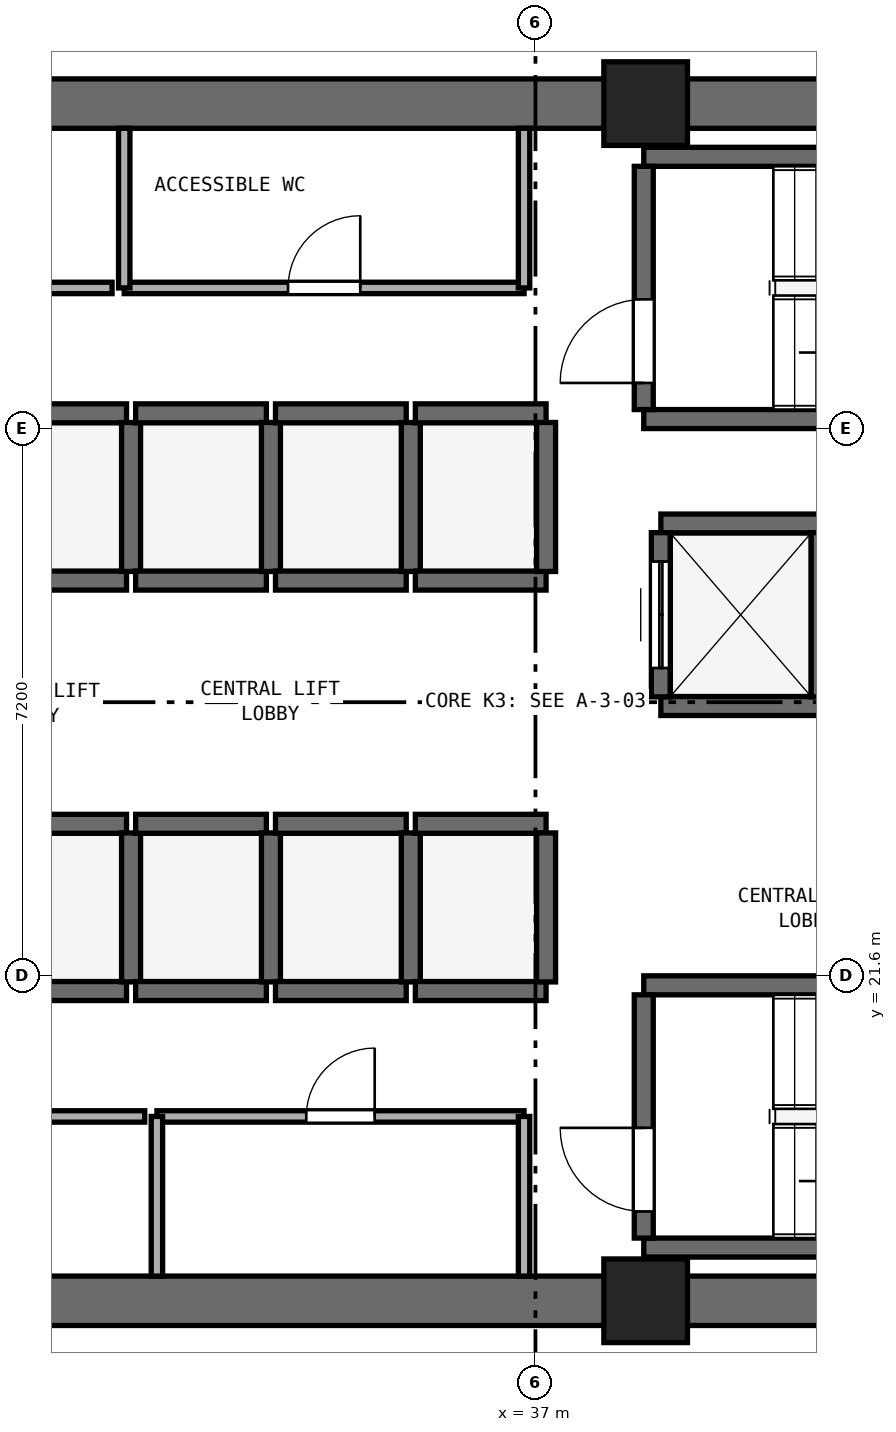
"""IFC4 building model, lengths in metres.
Left out: names, types, materials, properties, quantities, classifications, styles, units other than length and angle.
Written with IfcOpenShell. Run it as: python <this file> out.ifc"""

import sys

from ifc_helpers import new_model, si_unit, direction, frame, frame_2d, origin, origin_2d, place, context, subcontext, project, spatial, rectangle, extrude, element, fill, save


model = new_model("IFC4")
c1 = context("Model", 3, precision=1e-05, world=origin(), true_north=direction((0.0, 1.0)))
c2 = subcontext(c1, "Body", "Model", "MODEL_VIEW")
j1 = project(units=[si_unit("LENGTHUNIT", "METRE"), si_unit("PLANEANGLEUNIT", "RADIAN")], contexts=[c1])
p1 = place(None, origin())
s1 = spatial("IfcSite", under=j1, at=p1, CompositionType="ELEMENT")
p2 = place(p1, origin())
s2 = spatial("IfcBuilding", under=s1, at=p2, CompositionType="ELEMENT")
p3 = place(p2, frame((0.0, 0.0, 108.6)))
s3 = spatial("IfcBuildingStorey", under=s2, at=p3, CompositionType="ELEMENT", Elevation=108.6)
for number, where, z_axis, x_axis in (
    (1, (25.4, 17.325, 0.0), (0.0, 0.0, 1.0), (1.0, 0.0, 0.0)),
    (2, (25.4, 33.075, 0.0), (0.0, 0.0, 1.0), (1.0, 0.0, 0.0)),
):
    element("IfcWall", number, at=place(p3, frame(where, z_axis=z_axis, x_axis=x_axis)), inside=s3, PredefinedType="SHEAR", context=c2, shape_type="SweptSolid", body=[
        extrude(rectangle(XDim=23.2, YDim=0.65, at=frame_2d((11.6, 0.0))), origin(), (0.0, 0.0, 1.0), 3.525),
    ])
for number, where, z_axis, x_axis in (
    (3, (38.45, 17.325, 0.0), (0.0, 0.0, 1.0), (1.0, 0.0, 0.0)),
    (4, (38.45, 33.075, 0.0), (0.0, 0.0, 1.0), (1.0, 0.0, 0.0)),
):
    element("IfcColumn", number, at=place(p3, frame(where, z_axis=z_axis, x_axis=x_axis)), inside=s3, PredefinedType="PILASTER", context=c2, shape_type="SweptSolid", body=[
        extrude(rectangle(XDim=1.1, YDim=1.1, at=origin_2d()), origin(), (0.0, 0.0, 1.0), 3.8),
    ])
for number, where, z_axis, x_axis in (
    (5, (38.425, 28.925, 0.0), (0.0, 0.0, 1.0), (1.0, 0.0, 0.0)),
    (6, (38.425, 32.375, 0.0), (0.0, 0.0, 1.0), (1.0, 0.0, 0.0)),
):
    element("IfcWall", number, at=place(p3, frame(where, z_axis=z_axis, x_axis=x_axis)), inside=s3, PredefinedType="SHEAR", context=c2, shape_type="SweptSolid", body=[
        extrude(rectangle(XDim=7.3, YDim=0.25, at=frame_2d((3.65, 0.0))), origin(), (0.0, 0.0, 1.0), 3.525),
    ])
p4 = place(p3, frame((38.425, 29.05, 0.0), z_axis=(0.0, 0.0, 1.0), x_axis=(0.0, 1.0, 0.0)))
e7 = element("IfcWall", 7, at=p4, inside=s3, PredefinedType="SHEAR", context=c2, shape_type="SweptSolid", body=[
    extrude(rectangle(XDim=3.2, YDim=0.25, at=frame_2d((1.6, 0.0))), origin(), (0.0, 0.0, 1.0), 3.525),
])
p5 = place(p4, frame((0.35, 0.0, 0.0)))
e8 = element("IfcOpeningElement", 8, at=p5, cuts=e7, PredefinedType="OPENING", context=c2, shape_type="SweptSolid", body=[
    extrude(rectangle(XDim=1.1, YDim=2.15, at=frame_2d((0.55, 1.075))), frame((0.0, 0.135, 0.0), z_axis=(0.0, -1.0, 0.0), x_axis=(1.0, 0.0, 0.0)), (0.0, 0.0, 1.0), 0.27),
])
for number, where, z_axis, x_axis in (
    (9, (38.425, 18.025, 0.0), (0.0, 0.0, 1.0), (1.0, 0.0, 0.0)),
    (10, (38.425, 21.475, 0.0), (0.0, 0.0, 1.0), (1.0, 0.0, 0.0)),
):
    element("IfcWall", number, at=place(p3, frame(where, z_axis=z_axis, x_axis=x_axis)), inside=s3, PredefinedType="SHEAR", context=c2, shape_type="SweptSolid", body=[
        extrude(rectangle(XDim=7.3, YDim=0.25, at=frame_2d((3.65, 0.0))), origin(), (0.0, 0.0, 1.0), 3.525),
    ])
p6 = place(p3, frame((38.425, 18.15, 0.0), z_axis=(0.0, 0.0, 1.0), x_axis=(0.0, 1.0, 0.0)))
e11 = element("IfcWall", 11, at=p6, inside=s3, PredefinedType="SHEAR", context=c2, shape_type="SweptSolid", body=[
    extrude(rectangle(XDim=3.2, YDim=0.25, at=frame_2d((1.6, 0.0))), origin(), (0.0, 0.0, 1.0), 3.525),
])
p7 = place(p6, frame((0.35, 0.0, 0.0)))
e12 = element("IfcOpeningElement", 12, at=p7, cuts=e11, PredefinedType="OPENING", context=c2, shape_type="SweptSolid", body=[
    extrude(rectangle(XDim=1.1, YDim=2.15, at=frame_2d((0.55, 1.075))), frame((0.0, 0.135, 0.0), z_axis=(0.0, -1.0, 0.0), x_axis=(1.0, 0.0, 0.0)), (0.0, 0.0, 1.0), 0.27),
])
for number, where, z_axis, x_axis in (
    (13, (29.9, 21.4, 0.0), (0.0, 0.0, 1.0), (1.0, 0.0, 0.0)),
    (14, (29.9, 23.6, 0.0), (0.0, 0.0, 1.0), (1.0, 0.0, 0.0)),
):
    element("IfcWall", number, at=place(p3, frame(where, z_axis=z_axis, x_axis=x_axis)), inside=s3, PredefinedType="SHEAR", context=c2, shape_type="SweptSolid", body=[
        extrude(rectangle(XDim=1.72, YDim=0.25, at=frame_2d((0.86, 0.0))), origin(), (0.0, 0.0, 1.0), 3.525),
    ])
p8 = place(p3, frame((31.68, 21.52, 0.0), z_axis=(0.0, 0.0, 1.0), x_axis=(0.0, 1.0, 0.0)))
e15 = element("IfcWall", 15, at=p8, inside=s3, PredefinedType="SHEAR", context=c2, shape_type="SweptSolid", body=[
    extrude(rectangle(XDim=1.96, YDim=0.25, at=frame_2d((0.98, 0.0))), origin(), (0.0, 0.0, 1.0), 3.525),
])
for number, where, z_axis, x_axis in (
    (16, (31.74, 21.4, 0.0), (0.0, 0.0, 1.0), (1.0, 0.0, 0.0)),
    (17, (31.74, 23.6, 0.0), (0.0, 0.0, 1.0), (1.0, 0.0, 0.0)),
):
    element("IfcWall", number, at=place(p3, frame(where, z_axis=z_axis, x_axis=x_axis)), inside=s3, PredefinedType="SHEAR", context=c2, shape_type="SweptSolid", body=[
        extrude(rectangle(XDim=1.72, YDim=0.25, at=frame_2d((0.86, 0.0))), origin(), (0.0, 0.0, 1.0), 3.525),
    ])
p9 = place(p3, frame((33.52, 21.52, 0.0), z_axis=(0.0, 0.0, 1.0), x_axis=(0.0, 1.0, 0.0)))
e18 = element("IfcWall", 18, at=p9, inside=s3, PredefinedType="SHEAR", context=c2, shape_type="SweptSolid", body=[
    extrude(rectangle(XDim=1.96, YDim=0.25, at=frame_2d((0.98, 0.0))), origin(), (0.0, 0.0, 1.0), 3.525),
])
for number, where, z_axis, x_axis in (
    (19, (33.58, 21.4, 0.0), (0.0, 0.0, 1.0), (1.0, 0.0, 0.0)),
    (20, (33.58, 23.6, 0.0), (0.0, 0.0, 1.0), (1.0, 0.0, 0.0)),
):
    element("IfcWall", number, at=place(p3, frame(where, z_axis=z_axis, x_axis=x_axis)), inside=s3, PredefinedType="SHEAR", context=c2, shape_type="SweptSolid", body=[
        extrude(rectangle(XDim=1.72, YDim=0.25, at=frame_2d((0.86, 0.0))), origin(), (0.0, 0.0, 1.0), 3.525),
    ])
p10 = place(p3, frame((35.36, 21.52, 0.0), z_axis=(0.0, 0.0, 1.0), x_axis=(0.0, 1.0, 0.0)))
e21 = element("IfcWall", 21, at=p10, inside=s3, PredefinedType="SHEAR", context=c2, shape_type="SweptSolid", body=[
    extrude(rectangle(XDim=1.96, YDim=0.25, at=frame_2d((0.98, 0.0))), origin(), (0.0, 0.0, 1.0), 3.525),
])
for number, where, z_axis, x_axis in (
    (22, (35.42, 21.4, 0.0), (0.0, 0.0, 1.0), (1.0, 0.0, 0.0)),
    (23, (35.42, 23.6, 0.0), (0.0, 0.0, 1.0), (1.0, 0.0, 0.0)),
):
    element("IfcWall", number, at=place(p3, frame(where, z_axis=z_axis, x_axis=x_axis)), inside=s3, PredefinedType="SHEAR", context=c2, shape_type="SweptSolid", body=[
        extrude(rectangle(XDim=1.72, YDim=0.25, at=frame_2d((0.86, 0.0))), origin(), (0.0, 0.0, 1.0), 3.525),
    ])
p11 = place(p3, frame((37.14, 21.52, 0.0), z_axis=(0.0, 0.0, 1.0), x_axis=(0.0, 1.0, 0.0)))
e24 = element("IfcWall", 24, at=p11, inside=s3, PredefinedType="SHEAR", context=c2, shape_type="SweptSolid", body=[
    extrude(rectangle(XDim=1.96, YDim=0.25, at=frame_2d((0.98, 0.0))), origin(), (0.0, 0.0, 1.0), 3.525),
])
for number, where, z_axis, x_axis in (
    (25, (29.9, 26.8, 0.0), (0.0, 0.0, 1.0), (1.0, 0.0, 0.0)),
    (26, (29.9, 29.0, 0.0), (0.0, 0.0, 1.0), (1.0, 0.0, 0.0)),
):
    element("IfcWall", number, at=place(p3, frame(where, z_axis=z_axis, x_axis=x_axis)), inside=s3, PredefinedType="SHEAR", context=c2, shape_type="SweptSolid", body=[
        extrude(rectangle(XDim=1.72, YDim=0.25, at=frame_2d((0.86, 0.0))), origin(), (0.0, 0.0, 1.0), 3.525),
    ])
p12 = place(p3, frame((31.68, 26.92, 0.0), z_axis=(0.0, 0.0, 1.0), x_axis=(0.0, 1.0, 0.0)))
e27 = element("IfcWall", 27, at=p12, inside=s3, PredefinedType="SHEAR", context=c2, shape_type="SweptSolid", body=[
    extrude(rectangle(XDim=1.96, YDim=0.25, at=frame_2d((0.98, 0.0))), origin(), (0.0, 0.0, 1.0), 3.525),
])
for number, where, z_axis, x_axis in (
    (28, (31.74, 26.8, 0.0), (0.0, 0.0, 1.0), (1.0, 0.0, 0.0)),
    (29, (31.74, 29.0, 0.0), (0.0, 0.0, 1.0), (1.0, 0.0, 0.0)),
):
    element("IfcWall", number, at=place(p3, frame(where, z_axis=z_axis, x_axis=x_axis)), inside=s3, PredefinedType="SHEAR", context=c2, shape_type="SweptSolid", body=[
        extrude(rectangle(XDim=1.72, YDim=0.25, at=frame_2d((0.86, 0.0))), origin(), (0.0, 0.0, 1.0), 3.525),
    ])
p13 = place(p3, frame((33.52, 26.92, 0.0), z_axis=(0.0, 0.0, 1.0), x_axis=(0.0, 1.0, 0.0)))
e30 = element("IfcWall", 30, at=p13, inside=s3, PredefinedType="SHEAR", context=c2, shape_type="SweptSolid", body=[
    extrude(rectangle(XDim=1.96, YDim=0.25, at=frame_2d((0.98, 0.0))), origin(), (0.0, 0.0, 1.0), 3.525),
])
for number, where, z_axis, x_axis in (
    (31, (33.58, 26.8, 0.0), (0.0, 0.0, 1.0), (1.0, 0.0, 0.0)),
    (32, (33.58, 29.0, 0.0), (0.0, 0.0, 1.0), (1.0, 0.0, 0.0)),
):
    element("IfcWall", number, at=place(p3, frame(where, z_axis=z_axis, x_axis=x_axis)), inside=s3, PredefinedType="SHEAR", context=c2, shape_type="SweptSolid", body=[
        extrude(rectangle(XDim=1.72, YDim=0.25, at=frame_2d((0.86, 0.0))), origin(), (0.0, 0.0, 1.0), 3.525),
    ])
p14 = place(p3, frame((35.36, 26.92, 0.0), z_axis=(0.0, 0.0, 1.0), x_axis=(0.0, 1.0, 0.0)))
e33 = element("IfcWall", 33, at=p14, inside=s3, PredefinedType="SHEAR", context=c2, shape_type="SweptSolid", body=[
    extrude(rectangle(XDim=1.96, YDim=0.25, at=frame_2d((0.98, 0.0))), origin(), (0.0, 0.0, 1.0), 3.525),
])
for number, where, z_axis, x_axis in (
    (34, (35.42, 26.8, 0.0), (0.0, 0.0, 1.0), (1.0, 0.0, 0.0)),
    (35, (35.42, 29.0, 0.0), (0.0, 0.0, 1.0), (1.0, 0.0, 0.0)),
):
    element("IfcWall", number, at=place(p3, frame(where, z_axis=z_axis, x_axis=x_axis)), inside=s3, PredefinedType="SHEAR", context=c2, shape_type="SweptSolid", body=[
        extrude(rectangle(XDim=1.72, YDim=0.25, at=frame_2d((0.86, 0.0))), origin(), (0.0, 0.0, 1.0), 3.525),
    ])
p15 = place(p3, frame((37.14, 26.92, 0.0), z_axis=(0.0, 0.0, 1.0), x_axis=(0.0, 1.0, 0.0)))
e36 = element("IfcWall", 36, at=p15, inside=s3, PredefinedType="SHEAR", context=c2, shape_type="SweptSolid", body=[
    extrude(rectangle(XDim=1.96, YDim=0.25, at=frame_2d((0.98, 0.0))), origin(), (0.0, 0.0, 1.0), 3.525),
])
for number, where, z_axis, x_axis in (
    (37, (38.65, 25.15, 0.0), (0.0, 0.0, 1.0), (1.0, 0.0, 0.0)),
    (38, (38.65, 27.55, 0.0), (0.0, 0.0, 1.0), (1.0, 0.0, 0.0)),
):
    element("IfcWall", number, at=place(p3, frame(where, z_axis=z_axis, x_axis=x_axis)), inside=s3, PredefinedType="SHEAR", context=c2, shape_type="SweptSolid", body=[
        extrude(rectangle(XDim=2.1, YDim=0.25, at=frame_2d((1.05, 0.0))), origin(), (0.0, 0.0, 1.0), 3.525),
    ])
p16 = place(p3, frame((38.65, 25.27, 0.0), z_axis=(0.0, 0.0, 1.0), x_axis=(0.0, 1.0, 0.0)))
e39 = element("IfcWall", 39, at=p16, inside=s3, PredefinedType="SHEAR", context=c2, shape_type="SweptSolid", body=[
    extrude(rectangle(XDim=2.16, YDim=0.25, at=frame_2d((1.08, 0.0))), origin(), (0.0, 0.0, 1.0), 3.525),
])
p17 = place(p16, frame((0.38, 0.0, 0.0)))
e40 = element("IfcOpeningElement", 40, at=p17, cuts=e39, PredefinedType="OPENING", context=c2, shape_type="SweptSolid", body=[
    extrude(rectangle(XDim=1.4, YDim=2.2, at=frame_2d((0.7, 1.1))), frame((0.0, 0.135, 0.0), z_axis=(0.0, -1.0, 0.0), x_axis=(1.0, 0.0, 0.0)), (0.0, 0.0, 1.0), 0.27),
])
p18 = place(p3, frame((40.75, 25.27, 0.0), z_axis=(0.0, 0.0, 1.0), x_axis=(0.0, 1.0, 0.0)))
e41 = element("IfcWall", 41, at=p18, inside=s3, PredefinedType="SHEAR", context=c2, shape_type="SweptSolid", body=[
    extrude(rectangle(XDim=2.16, YDim=0.25, at=frame_2d((1.08, 0.0))), origin(), (0.0, 0.0, 1.0), 3.525),
])
p19 = place(p3, frame((26.17, 30.65, 0.0), z_axis=(0.0, 0.0, 1.0), x_axis=(1.0, 0.0, 0.0)))
e42 = element("IfcWall", 42, at=p19, inside=s3, PredefinedType="PARTITIONING", context=c2, shape_type="SweptSolid", body=[
    extrude(rectangle(XDim=5.26, YDim=0.15, at=frame_2d((2.63, 0.0))), origin(), (0.0, 0.0, 1.0), 3.525),
])
p20 = place(p19, frame((2.155, 0.0, 0.0)))
e43 = element("IfcOpeningElement", 43, at=p20, cuts=e42, PredefinedType="OPENING", context=c2, shape_type="SweptSolid", body=[
    extrude(rectangle(XDim=0.95, YDim=2.1, at=frame_2d((0.475, 1.05))), frame((0.0, 0.085, 0.0), z_axis=(0.0, -1.0, 0.0), x_axis=(1.0, 0.0, 0.0)), (0.0, 0.0, 1.0), 0.17),
])
p21 = place(p3, frame((31.59, 30.65, 0.0), z_axis=(0.0, 0.0, 1.0), x_axis=(1.0, 0.0, 0.0)))
e44 = element("IfcWall", 44, at=p21, inside=s3, PredefinedType="PARTITIONING", context=c2, shape_type="SweptSolid", body=[
    extrude(rectangle(XDim=5.26, YDim=0.15, at=frame_2d((2.63, 0.0))), origin(), (0.0, 0.0, 1.0), 3.525),
])
p22 = place(p21, frame((2.155, 0.0, 0.0)))
e45 = element("IfcOpeningElement", 45, at=p22, cuts=e44, PredefinedType="OPENING", context=c2, shape_type="SweptSolid", body=[
    extrude(rectangle(XDim=0.95, YDim=2.1, at=frame_2d((0.475, 1.05))), frame((0.0, 0.085, 0.0), z_axis=(0.0, -1.0, 0.0), x_axis=(1.0, 0.0, 0.0)), (0.0, 0.0, 1.0), 0.17),
])
for number, where, z_axis, x_axis in (
    (46, (31.59, 30.65, 0.0), (0.0, 0.0, 1.0), (0.0, 1.0, 0.0)),
    (47, (36.85, 30.65, 0.0), (0.0, 0.0, 1.0), (0.0, 1.0, 0.0)),
):
    element("IfcWall", number, at=place(p3, frame(where, z_axis=z_axis, x_axis=x_axis)), inside=s3, PredefinedType="PARTITIONING", context=c2, shape_type="SweptSolid", body=[
        extrude(rectangle(XDim=2.1, YDim=0.15, at=frame_2d((1.05, 0.0))), origin(), (0.0, 0.0, 1.0), 3.525),
    ])
p23 = place(p3, frame((26.17, 19.75, 0.0), z_axis=(0.0, 0.0, 1.0), x_axis=(1.0, 0.0, 0.0)))
e48 = element("IfcWall", 48, at=p23, inside=s3, PredefinedType="PARTITIONING", context=c2, shape_type="SweptSolid", body=[
    extrude(rectangle(XDim=5.69, YDim=0.15, at=frame_2d((2.845, 0.0))), origin(), (0.0, 0.0, 1.0), 3.525),
])
p24 = place(p23, frame((2.37, 0.0, 0.0)))
e49 = element("IfcOpeningElement", 49, at=p24, cuts=e48, PredefinedType="OPENING", context=c2, shape_type="SweptSolid", body=[
    extrude(rectangle(XDim=0.95, YDim=2.1, at=frame_2d((0.475, 1.05))), frame((0.0, 0.085, 0.0), z_axis=(0.0, -1.0, 0.0), x_axis=(1.0, 0.0, 0.0)), (0.0, 0.0, 1.0), 0.17),
])
p25 = place(p3, frame((32.02, 19.75, 0.0), z_axis=(0.0, 0.0, 1.0), x_axis=(1.0, 0.0, 0.0)))
e50 = element("IfcWall", 50, at=p25, inside=s3, PredefinedType="PARTITIONING", context=c2, shape_type="SweptSolid", body=[
    extrude(rectangle(XDim=4.83, YDim=0.15, at=frame_2d((2.415, 0.0))), origin(), (0.0, 0.0, 1.0), 3.525),
])
p26 = place(p25, frame((1.965, 0.0, 0.0)))
e51 = element("IfcOpeningElement", 51, at=p26, cuts=e50, PredefinedType="OPENING", context=c2, shape_type="SweptSolid", body=[
    extrude(rectangle(XDim=0.9, YDim=2.1, at=frame_2d((0.45, 1.05))), frame((0.0, 0.085, 0.0), z_axis=(0.0, -1.0, 0.0), x_axis=(1.0, 0.0, 0.0)), (0.0, 0.0, 1.0), 0.17),
])
for number, where, z_axis, x_axis in (
    (52, (32.02, 17.65, 0.0), (0.0, 0.0, 1.0), (0.0, 1.0, 0.0)),
    (53, (36.85, 17.65, 0.0), (0.0, 0.0, 1.0), (0.0, 1.0, 0.0)),
):
    element("IfcWall", number, at=place(p3, frame(where, z_axis=z_axis, x_axis=x_axis)), inside=s3, PredefinedType="PARTITIONING", context=c2, shape_type="SweptSolid", body=[
        extrude(rectangle(XDim=2.1, YDim=0.15, at=frame_2d((1.05, 0.0))), origin(), (0.0, 0.0, 1.0), 3.525),
    ])
p27 = place(p5, origin())
e54 = element("IfcDoor", 54, at=p27, inside=s3, OperationType="SINGLE_SWING_LEFT", PredefinedType="DOOR", context=c2, shape_type="SweptSolid", body=[
    extrude(rectangle(XDim=1.1, YDim=2.15, at=frame_2d((0.55, 1.075))), frame((0.0, 0.025, 0.0), z_axis=(0.0, -1.0, 0.0), x_axis=(1.0, 0.0, 0.0)), (0.0, 0.0, 1.0), 0.05),
])
fill(e8, e54)
p28 = place(p7, origin())
e55 = element("IfcDoor", 55, at=p28, inside=s3, OperationType="SINGLE_SWING_RIGHT", PredefinedType="DOOR", context=c2, shape_type="SweptSolid", body=[
    extrude(rectangle(XDim=1.1, YDim=2.15, at=frame_2d((0.55, 1.075))), frame((0.0, 0.025, 0.0), z_axis=(0.0, -1.0, 0.0), x_axis=(1.0, 0.0, 0.0)), (0.0, 0.0, 1.0), 0.05),
])
fill(e12, e55)
p29 = place(p17, origin())
e56 = element("IfcDoor", 56, at=p29, inside=s3, OperationType="DOUBLE_DOOR_SLIDING", PredefinedType="DOOR", context=c2, shape_type="SweptSolid", body=[
    extrude(rectangle(XDim=1.4, YDim=2.2, at=frame_2d((0.7, 1.1))), frame((0.0, 0.025, 0.0), z_axis=(0.0, -1.0, 0.0), x_axis=(1.0, 0.0, 0.0)), (0.0, 0.0, 1.0), 0.05),
])
fill(e40, e56)
p30 = place(p22, origin())
e57 = element("IfcDoor", 57, at=p30, inside=s3, OperationType="SINGLE_SWING_RIGHT", PredefinedType="DOOR", context=c2, shape_type="SweptSolid", body=[
    extrude(rectangle(XDim=0.95, YDim=2.1, at=frame_2d((0.475, 1.05))), frame((0.0, 0.025, 0.0), z_axis=(0.0, -1.0, 0.0), x_axis=(1.0, 0.0, 0.0)), (0.0, 0.0, 1.0), 0.05),
])
fill(e45, e57)
p31 = place(p26, origin())
e58 = element("IfcDoor", 58, at=p31, inside=s3, OperationType="SINGLE_SWING_RIGHT", PredefinedType="DOOR", context=c2, shape_type="SweptSolid", body=[
    extrude(rectangle(XDim=0.9, YDim=2.1, at=frame_2d((0.45, 1.05))), frame((0.0, 0.025, 0.0), z_axis=(0.0, -1.0, 0.0), x_axis=(1.0, 0.0, 0.0)), (0.0, 0.0, 1.0), 0.05),
])
fill(e51, e58)
save(model, sys.argv[1])
